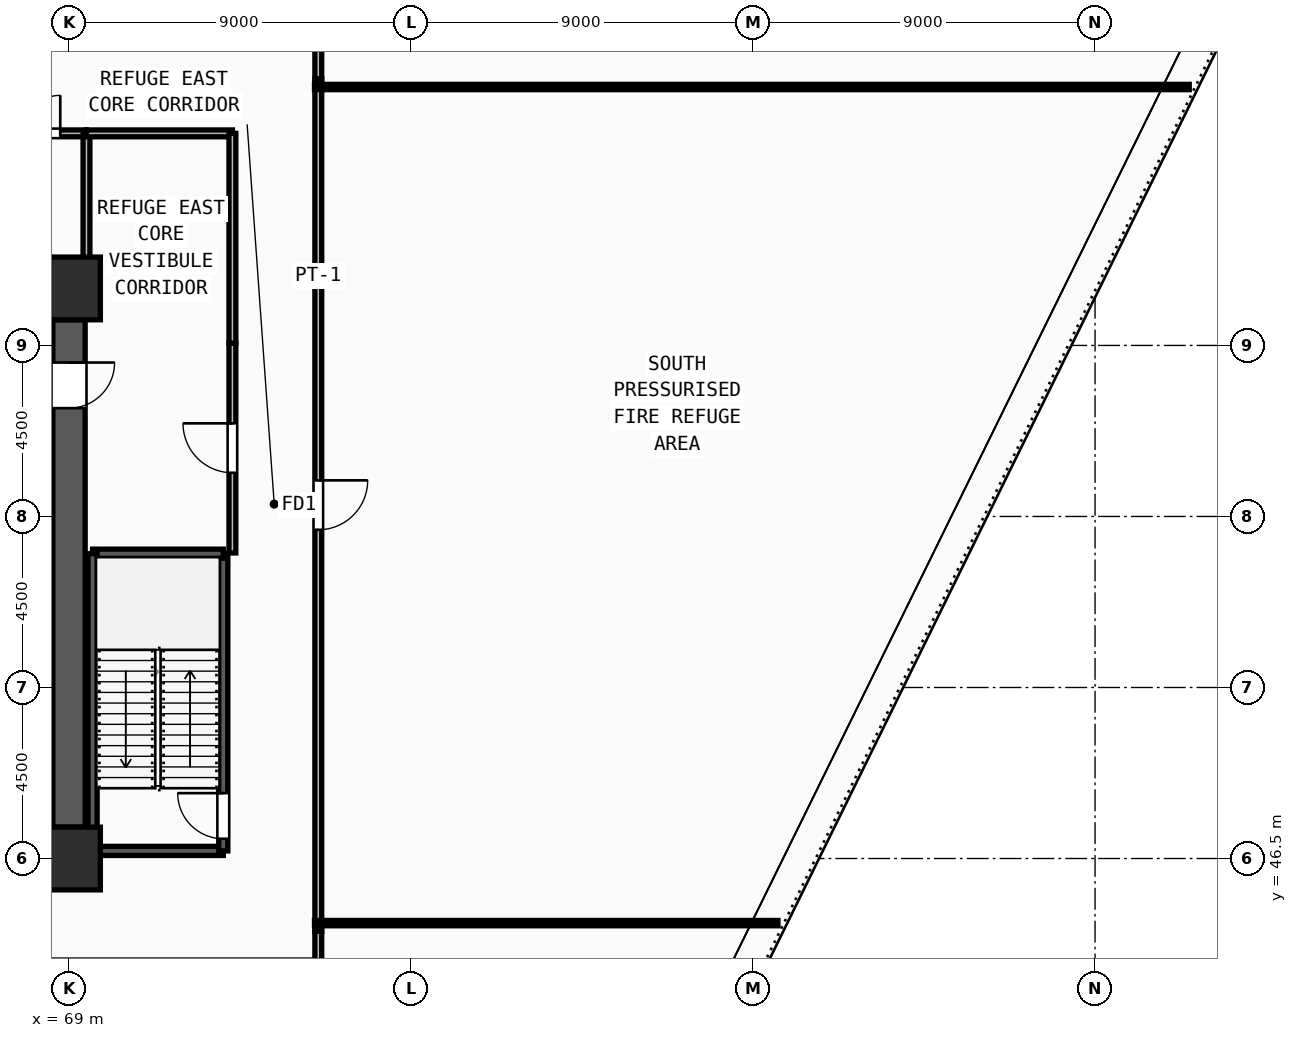
"""IFC4 building model, lengths in metres.
Left out: names, types, materials, properties, quantities, classifications, styles, units other than length and angle.
Written with IfcOpenShell. Run it as: python <this file> out.ifc"""

import sys

from ifc_helpers import new_model, si_unit, direction, frame, frame_2d, origin, origin_2d, place, context, subcontext, project, spatial, rectangle, extrude, source, transform, mapped, element, fill, save


model = new_model("IFC4")
c1 = context("Model", 3, precision=1e-05, world=origin(), true_north=direction((0.0, 1.0)))
c2 = subcontext(c1, "Body", "Model", "MODEL_VIEW")
j1 = project(units=[si_unit("LENGTHUNIT", "METRE"), si_unit("PLANEANGLEUNIT", "RADIAN")], contexts=[c1])
p1 = place(None, origin())
s1 = spatial("IfcSite", under=j1, at=p1, CompositionType="ELEMENT")
p2 = place(p1, origin())
s2 = spatial("IfcBuilding", under=s1, at=p2, CompositionType="ELEMENT")
p3 = place(p2, frame((0.0, 0.0, 47.25)))
s3 = spatial("IfcBuildingStorey", under=s2, at=p3, CompositionType="ELEMENT", Elevation=47.25)
m1 = source(origin(), c2, "Body", "SweptSolid", [
    extrude(rectangle(XDim=1.65, YDim=1.65, at=origin_2d()), origin(), (0.0, 0.0, 1.0), 4.5),
])
for number, where, z_axis, x_axis in (
    (1, (69.0, 46.5, 0.0), (0.0, 0.0, 1.0), (1.0, 0.0, 0.0)),
    (2, (69.0, 61.5, 0.0), (0.0, 0.0, 1.0), (1.0, 0.0, 0.0)),
):
    element("IfcColumn", number, at=place(p3, frame(where, z_axis=z_axis, x_axis=x_axis)), inside=s3, PredefinedType="COLUMN", context=c2, shape_type="MappedRepresentation", body=[
        mapped(m1, transform((0.0, 0.0, 0.0), x_axis=(1.0, 0.0, 0.0), y_axis=(0.0, 1.0, 0.0), z_axis=(0.0, 0.0, 1.0), scale=1.0)),
    ])
p4 = place(p3, frame((69.0, 60.675, 0.0), z_axis=(0.0, 0.0, 1.0), x_axis=(0.0, -1.0, 0.0)))
e3 = element("IfcWall", 3, at=p4, inside=s3, PredefinedType="SHEAR", context=c2, shape_type="SweptSolid", body=[
    extrude(rectangle(XDim=13.35, YDim=0.85, at=frame_2d((6.675, 0.0))), origin(), (0.0, 0.0, 1.0), 4.32),
])
m2 = source(origin(), c2, "Body", "SweptSolid", [
    extrude(rectangle(XDim=1.2, YDim=2.2, at=frame_2d((0.6, 1.1))), frame((0.0, 0.435, 0.0), z_axis=(0.0, -1.0, 0.0), x_axis=(1.0, 0.0, 0.0)), (0.0, 0.0, 1.0), 0.87),
])
p5 = place(p4, frame((1.125, 0.0, 0.0)))
e4 = element("IfcOpeningElement", 4, at=p5, cuts=e3, PredefinedType="OPENING", context=c2, shape_type="MappedRepresentation", body=[
    mapped(m2, transform((0.0, 0.0, 0.0), x_axis=(1.0, 0.0, 0.0), y_axis=(0.0, 1.0, 0.0), z_axis=(0.0, 0.0, 1.0), scale=1.0)),
])
p6 = place(p3, frame((69.62, 46.7, 0.0), z_axis=(0.0, 0.0, 1.0), x_axis=(1.0, 0.0, 0.0)))
e5 = element("IfcWall", 5, at=p6, inside=s3, PredefinedType="SOLIDWALL", context=c2, shape_type="SweptSolid", body=[
    extrude(rectangle(XDim=3.44, YDim=0.24, at=frame_2d((1.72, 0.0))), origin(), (0.0, 0.0, 1.0), 4.32),
])
p7 = place(p3, frame((73.06, 46.7, 0.0), z_axis=(0.0, 0.0, 1.0), x_axis=(0.0, 1.0, 0.0)))
e6 = element("IfcWall", 6, at=p7, inside=s3, PredefinedType="SOLIDWALL", context=c2, shape_type="SweptSolid", body=[
    extrude(rectangle(XDim=7.82, YDim=0.24, at=frame_2d((3.91, 0.0))), origin(), (0.0, 0.0, 1.0), 4.32),
])
m3 = source(origin(), c2, "Body", "SweptSolid", [
    extrude(rectangle(XDim=1.2, YDim=2.2, at=frame_2d((0.6, 1.1))), frame((0.0, 0.13, 0.0), z_axis=(0.0, -1.0, 0.0), x_axis=(1.0, 0.0, 0.0)), (0.0, 0.0, 1.0), 0.26),
])
p8 = place(p7, frame((0.32, 0.0, 0.0)))
e7 = element("IfcOpeningElement", 7, at=p8, cuts=e6, PredefinedType="OPENING", context=c2, shape_type="MappedRepresentation", body=[
    mapped(m3, transform((0.0, 0.0, 0.0), x_axis=(1.0, 0.0, 0.0), y_axis=(0.0, 1.0, 0.0), z_axis=(0.0, 0.0, 1.0), scale=1.0)),
])
p9 = place(p3, frame((73.06, 54.52, 0.0), z_axis=(0.0, 0.0, 1.0), x_axis=(-1.0, 0.0, 0.0)))
e8 = element("IfcWall", 8, at=p9, inside=s3, PredefinedType="SOLIDWALL", context=c2, shape_type="SweptSolid", body=[
    extrude(rectangle(XDim=3.44, YDim=0.24, at=frame_2d((1.72, 0.0))), origin(), (0.0, 0.0, 1.0), 4.32),
])
p10 = place(p3, frame((69.62, 54.52, 0.0), z_axis=(0.0, 0.0, 1.0), x_axis=(0.0, -1.0, 0.0)))
e9 = element("IfcWall", 9, at=p10, inside=s3, PredefinedType="SOLIDWALL", context=c2, shape_type="SweptSolid", body=[
    extrude(rectangle(XDim=7.82, YDim=0.24, at=frame_2d((3.91, 0.0))), origin(), (0.0, 0.0, 1.0), 4.32),
])
p11 = place(p3, frame((67.08, 65.58, 0.0), z_axis=(0.0, 0.0, 1.0), x_axis=(1.0, 0.0, 0.0)))
e10 = element("IfcWall", 10, at=p11, inside=s3, PredefinedType="PARTITIONING", context=c2, shape_type="SweptSolid", body=[
    extrude(rectangle(XDim=2.38, YDim=0.18, at=frame_2d((1.19, 0.0))), origin(), (0.0, 0.0, 1.0), 4.32),
])
m4 = source(origin(), c2, "Body", "SweptSolid", [
    extrude(rectangle(XDim=1.0, YDim=2.2, at=frame_2d((0.5, 1.1))), frame((0.0, 0.1, 0.0), z_axis=(0.0, -1.0, 0.0), x_axis=(1.0, 0.0, 0.0)), (0.0, 0.0, 1.0), 0.2),
])
p12 = place(p11, frame((0.69, 0.0, 0.0)))
e11 = element("IfcOpeningElement", 11, at=p12, cuts=e10, PredefinedType="OPENING", context=c2, shape_type="MappedRepresentation", body=[
    mapped(m4, transform((0.0, 0.0, 0.0), x_axis=(1.0, 0.0, 0.0), y_axis=(0.0, 1.0, 0.0), z_axis=(0.0, 0.0, 1.0), scale=1.0)),
])
p13 = place(p3, frame((73.3, 54.54, 0.0), z_axis=(0.0, 0.0, 1.0), x_axis=(0.0, 1.0, 0.0)))
e12 = element("IfcWall", 12, at=p13, inside=s3, PredefinedType="PARTITIONING", context=c2, shape_type="SweptSolid", body=[
    extrude(rectangle(XDim=5.52, YDim=0.18, at=frame_2d((2.76, 0.0))), origin(), (0.0, 0.0, 1.0), 4.32),
])
m5 = source(origin(), c2, "Body", "SweptSolid", [
    extrude(rectangle(XDim=1.3, YDim=2.2, at=frame_2d((0.65, 1.1))), frame((0.0, 0.1, 0.0), z_axis=(0.0, -1.0, 0.0), x_axis=(1.0, 0.0, 0.0)), (0.0, 0.0, 1.0), 0.2),
])
p14 = place(p13, frame((2.11, 0.0, 0.0)))
e13 = element("IfcOpeningElement", 13, at=p14, cuts=e12, PredefinedType="OPENING", context=c2, shape_type="MappedRepresentation", body=[
    mapped(m5, transform((0.0, 0.0, 0.0), x_axis=(1.0, 0.0, 0.0), y_axis=(0.0, 1.0, 0.0), z_axis=(0.0, 0.0, 1.0), scale=1.0)),
])
p15 = place(p3, frame((75.56, 67.015, 0.0), z_axis=(0.0, 0.0, 1.0), x_axis=(0.0, -1.0, 0.0)))
e14 = element("IfcWall", 14, at=p15, inside=s3, PredefinedType="PARTITIONING", context=c2, shape_type="SweptSolid", body=[
    extrude(rectangle(XDim=22.43, YDim=0.18, at=frame_2d((11.215, 0.0))), origin(), (0.0, 0.0, 1.0), 4.32),
])
p16 = place(p15, frame((10.565, 0.0, 0.0)))
e15 = element("IfcOpeningElement", 15, at=p16, cuts=e14, PredefinedType="OPENING", context=c2, shape_type="MappedRepresentation", body=[
    mapped(m5, transform((0.0, 0.0, 0.0), x_axis=(1.0, 0.0, 0.0), y_axis=(0.0, 1.0, 0.0), z_axis=(0.0, 0.0, 1.0), scale=1.0)),
])
p17 = place(p3, frame((69.46, 61.95, 0.0), z_axis=(0.0, 0.0, 1.0), x_axis=(0.0, 1.0, 0.0)))
e16 = element("IfcWall", 16, at=p17, inside=s3, PredefinedType="PARTITIONING", context=c2, shape_type="SweptSolid", body=[
    extrude(rectangle(XDim=3.63, YDim=0.18, at=frame_2d((1.815, 0.0))), origin(), (0.0, 0.0, 1.0), 4.32),
])
p18 = place(p3, frame((69.46, 65.58, 0.0), z_axis=(0.0, 0.0, 1.0), x_axis=(1.0, 0.0, 0.0)))
e17 = element("IfcWall", 17, at=p18, inside=s3, PredefinedType="PARTITIONING", context=c2, shape_type="SweptSolid", body=[
    extrude(rectangle(XDim=3.84, YDim=0.18, at=frame_2d((1.92, 0.0))), origin(), (0.0, 0.0, 1.0), 4.32),
])
p19 = place(p3, frame((73.3, 60.06, 0.0), z_axis=(0.0, 0.0, 1.0), x_axis=(0.0, 1.0, 0.0)))
e18 = element("IfcWall", 18, at=p19, inside=s3, PredefinedType="PARTITIONING", context=c2, shape_type="SweptSolid", body=[
    extrude(rectangle(XDim=5.52, YDim=0.18, at=frame_2d((2.76, 0.0))), origin(), (0.0, 0.0, 1.0), 4.32),
])
p20 = place(p3, frame((75.56, 67.98, 0.0), z_axis=(0.0, 0.0, 1.0), x_axis=(0.0, -1.0, 0.0)))
e19 = element("IfcWall", 19, at=p20, inside=s3, PredefinedType="PARTITIONING", context=c2, shape_type="SweptSolid", body=[
    extrude(rectangle(XDim=0.965, YDim=0.18, at=frame_2d((0.482, 0.0))), origin(), (0.0, 0.0, 1.0), 4.32),
])
p21 = place(p3, frame((75.56, 44.585, 0.0), z_axis=(0.0, 0.0, 1.0), x_axis=(0.0, -1.0, 0.0)))
e20 = element("IfcWall", 20, at=p21, inside=s3, PredefinedType="PARTITIONING", context=c2, shape_type="SweptSolid", body=[
    extrude(rectangle(XDim=0.915, YDim=0.18, at=frame_2d((0.458, 0.0))), origin(), (0.0, 0.0, 1.0), 4.32),
])
p22 = place(p3, frame((75.46, 44.8, 0.0), z_axis=(0.0, 0.0, 1.0), x_axis=(1.0, 0.0, 0.0)))
e21 = element("IfcWall", 21, at=p22, inside=s3, PredefinedType="PARTITIONING", context=c2, shape_type="SweptSolid", body=[
    extrude(rectangle(XDim=12.196, YDim=0.14, at=frame_2d((6.098, 0.0))), origin(), (0.0, 0.0, 1.0), 3.455),
])
p23 = place(p3, frame((75.46, 66.8, 0.0), z_axis=(0.0, 0.0, 1.0), x_axis=(1.0, 0.0, 0.0)))
e22 = element("IfcWall", 22, at=p23, inside=s3, PredefinedType="PARTITIONING", context=c2, shape_type="SweptSolid", body=[
    extrude(rectangle(XDim=23.018, YDim=0.14, at=frame_2d((11.509, 0.0))), origin(), (0.0, 0.0, 1.0), 3.405),
])
m6 = source(origin(), c2, "Body", "SweptSolid", [
    extrude(rectangle(XDim=1.2, YDim=2.2, at=frame_2d((0.6, 1.1))), frame((0.0, 0.025, 0.0), z_axis=(0.0, -1.0, 0.0), x_axis=(1.0, 0.0, 0.0)), (0.0, 0.0, 1.0), 0.05),
])
p24 = place(p5, origin())
e23 = element("IfcDoor", 23, at=p24, inside=s3, OperationType="SINGLE_SWING_LEFT", PredefinedType="DOOR", context=c2, shape_type="MappedRepresentation", body=[
    mapped(m6, transform((0.0, 0.0, 0.0), x_axis=(1.0, 0.0, 0.0), y_axis=(0.0, 1.0, 0.0), z_axis=(0.0, 0.0, 1.0), scale=1.0)),
])
fill(e4, e23)
p25 = place(p8, origin())
e24 = element("IfcDoor", 24, at=p25, inside=s3, OperationType="SINGLE_SWING_RIGHT", PredefinedType="DOOR", context=c2, shape_type="MappedRepresentation", body=[
    mapped(m6, transform((0.0, 0.0, 0.0), x_axis=(1.0, 0.0, 0.0), y_axis=(0.0, 1.0, 0.0), z_axis=(0.0, 0.0, 1.0), scale=1.0)),
])
fill(e7, e24)
m7 = source(origin(), c2, "Body", "SweptSolid", [
    extrude(rectangle(XDim=1.0, YDim=2.2, at=frame_2d((0.5, 1.1))), frame((0.0, 0.025, 0.0), z_axis=(0.0, -1.0, 0.0), x_axis=(1.0, 0.0, 0.0)), (0.0, 0.0, 1.0), 0.05),
])
p26 = place(p12, origin())
e25 = element("IfcDoor", 25, at=p26, inside=s3, OperationType="SINGLE_SWING_RIGHT", PredefinedType="DOOR", context=c2, shape_type="MappedRepresentation", body=[
    mapped(m7, transform((0.0, 0.0, 0.0), x_axis=(1.0, 0.0, 0.0), y_axis=(0.0, 1.0, 0.0), z_axis=(0.0, 0.0, 1.0), scale=1.0)),
])
fill(e11, e25)
m8 = source(origin(), c2, "Body", "SweptSolid", [
    extrude(rectangle(XDim=1.3, YDim=2.2, at=frame_2d((0.65, 1.1))), frame((0.0, 0.025, 0.0), z_axis=(0.0, -1.0, 0.0), x_axis=(1.0, 0.0, 0.0)), (0.0, 0.0, 1.0), 0.05),
])
p27 = place(p14, origin())
e26 = element("IfcDoor", 26, at=p27, inside=s3, OperationType="SINGLE_SWING_RIGHT", PredefinedType="DOOR", context=c2, shape_type="MappedRepresentation", body=[
    mapped(m8, transform((0.0, 0.0, 0.0), x_axis=(1.0, 0.0, 0.0), y_axis=(0.0, 1.0, 0.0), z_axis=(0.0, 0.0, 1.0), scale=1.0)),
])
fill(e13, e26)
p28 = place(p16, origin())
e27 = element("IfcDoor", 27, at=p28, inside=s3, OperationType="SINGLE_SWING_LEFT", PredefinedType="DOOR", context=c2, shape_type="MappedRepresentation", body=[
    mapped(m8, transform((0.0, 0.0, 0.0), x_axis=(1.0, 0.0, 0.0), y_axis=(0.0, 1.0, 0.0), z_axis=(0.0, 0.0, 1.0), scale=1.0)),
])
fill(e15, e27)
save(model, sys.argv[1])
